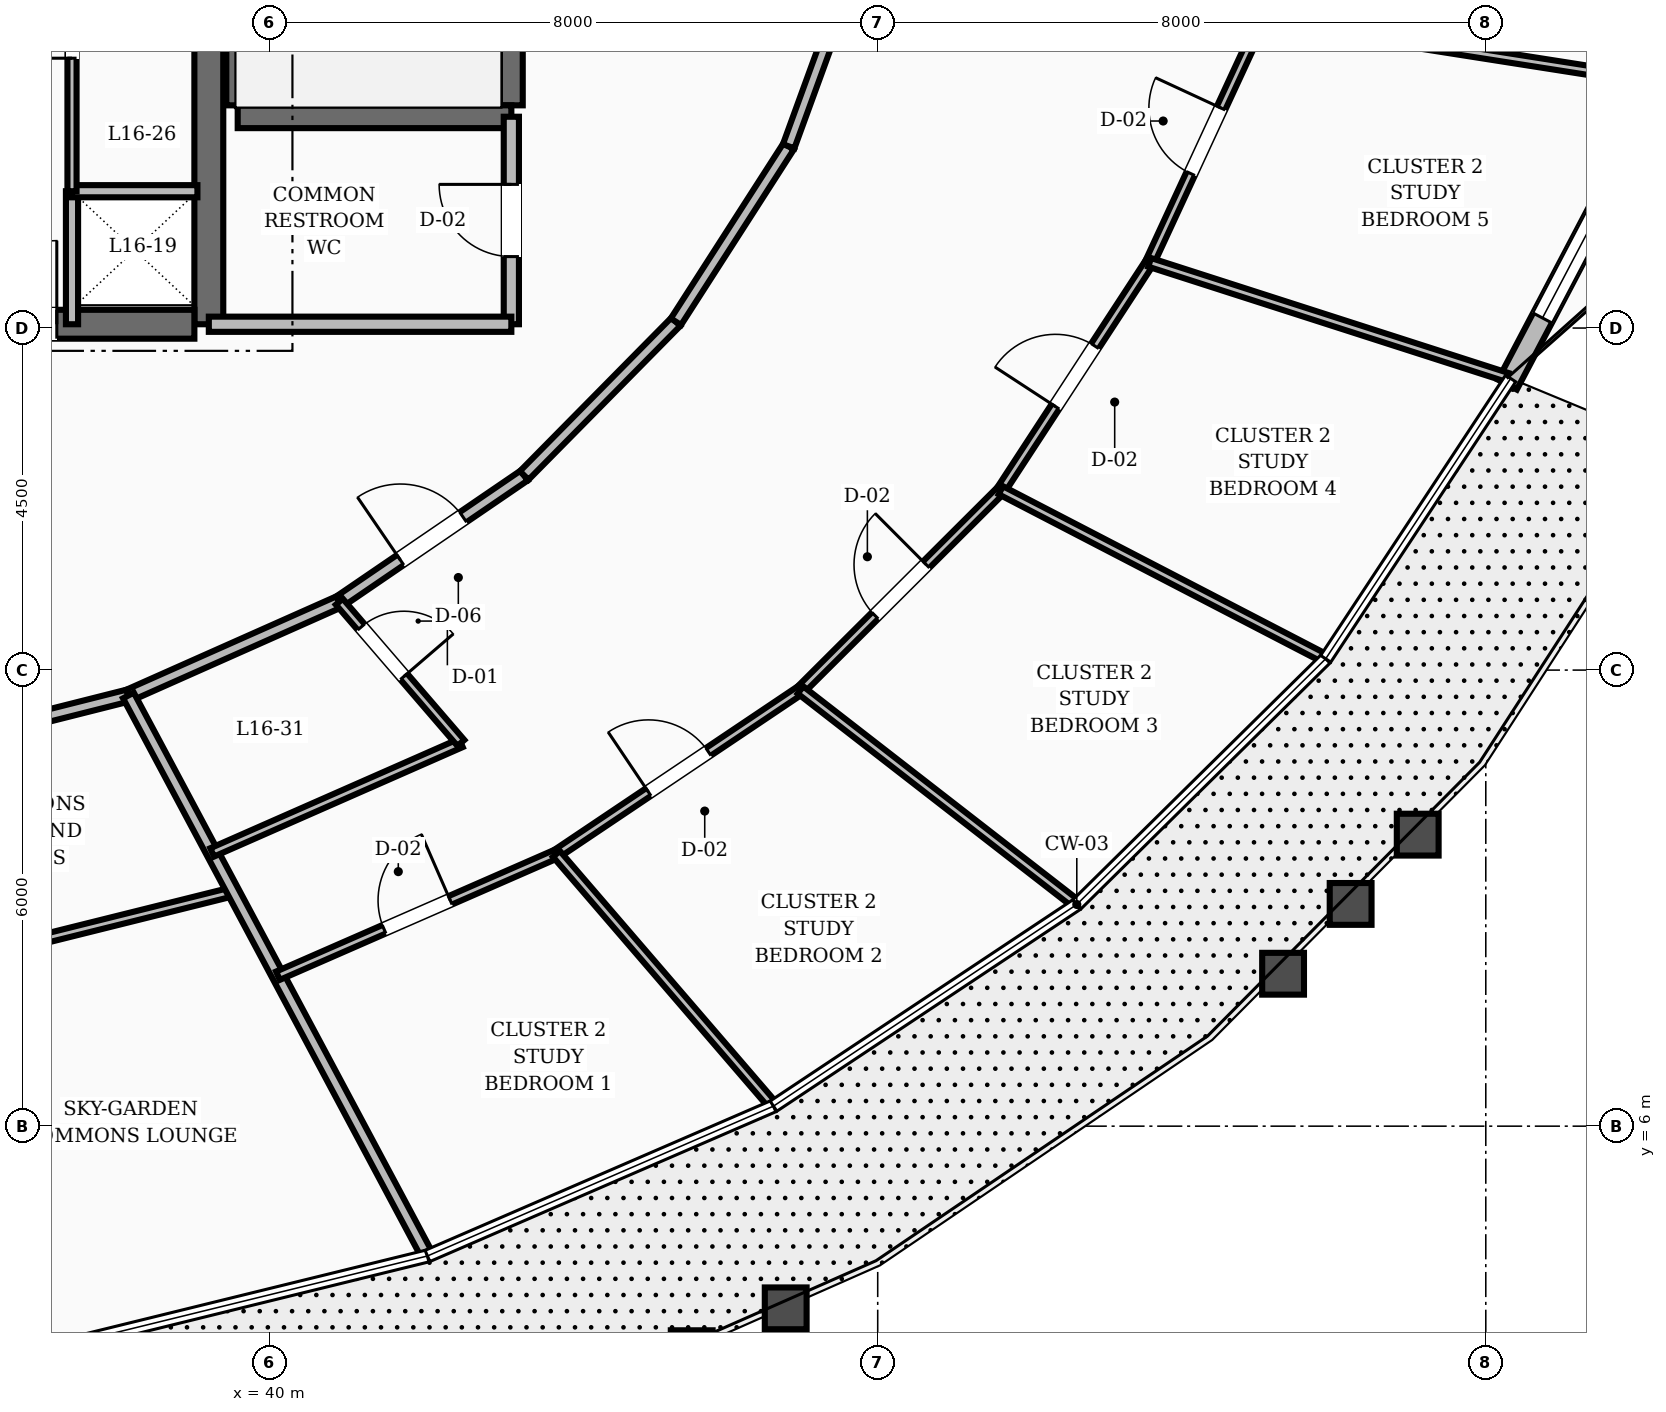
"""IFC4 building model, lengths in metres.
Left out: names, types, materials, properties, quantities, classifications, styles, units other than length and angle.
Written with IfcOpenShell. Run it as: python <this file> out.ifc"""

import sys

from ifc_helpers import new_model, si_unit, direction, frame, frame_2d, origin, place, context, subcontext, project, spatial, rectangle, extrude, element, fill, save


model = new_model("IFC4")
c1 = context("Model", 3, precision=1e-05, world=origin(), true_north=direction((0.0, 1.0)))
c2 = subcontext(c1, "Body", "Model", "MODEL_VIEW")
j1 = project(units=[si_unit("LENGTHUNIT", "METRE"), si_unit("PLANEANGLEUNIT", "RADIAN")], contexts=[c1])
p1 = place(None, origin())
s1 = spatial("IfcSite", under=j1, at=p1, CompositionType="ELEMENT")
p2 = place(p1, origin())
s2 = spatial("IfcBuilding", under=s1, at=p2, CompositionType="ELEMENT")
p3 = place(p2, frame((0.0, 0.0, 66.4)))
s3 = spatial("IfcBuildingStorey", under=s2, at=p3, CompositionType="ELEMENT", Elevation=66.4)
p4 = place(p3, frame((39.2, 16.55, 0.0), z_axis=(0.0, 0.0, 1.0), x_axis=(0.0, 1.0, 0.0)))
e1 = element("IfcWall", 1, at=p4, inside=s3, PredefinedType="SHEAR", context=c2, shape_type="SweptSolid", body=[
    extrude(rectangle(XDim=6.3, YDim=0.38, at=frame_2d((3.15, 0.0))), origin(), (0.0, 0.0, 1.0), 3.6),
])
p5 = place(p3, frame((35.8, 16.55, 0.0), z_axis=(0.0, 0.0, 1.0), x_axis=(1.0, 0.0, 0.0)))
e2 = element("IfcWall", 2, at=p5, inside=s3, PredefinedType="SHEAR", context=c2, shape_type="SweptSolid", body=[
    extrude(rectangle(XDim=3.21, YDim=0.38, at=frame_2d((1.605, 0.0))), origin(), (0.0, 0.0, 1.0), 3.6),
])
p6 = place(p5, frame((0.3, 0.0, 0.0)))
e3 = element("IfcOpeningElement", 3, at=p6, cuts=e2, PredefinedType="OPENING", context=c2, shape_type="SweptSolid", body=[
    extrude(rectangle(XDim=1.1, YDim=2.1, at=frame_2d((0.55, 1.05))), frame((0.0, 0.2, 0.0), z_axis=(0.0, -1.0, 0.0), x_axis=(1.0, 0.0, 0.0)), (0.0, 0.0, 1.0), 0.4),
])
for number, where, z_axis, x_axis in (
    (4, (43.18, 19.43, 0.0), (0.0, 0.0, 1.0), (0.0, 1.0, 0.0)),
    (5, (39.58, 19.43, 0.0), (0.0, 0.0, 1.0), (0.0, 1.0, 0.0)),
):
    element("IfcWall", number, at=place(p3, frame(where, z_axis=z_axis, x_axis=x_axis)), inside=s3, PredefinedType="SHEAR", context=c2, shape_type="SweptSolid", body=[
        extrude(rectangle(XDim=8.74, YDim=0.3, at=frame_2d((4.37, 0.0))), origin(), (0.0, 0.0, 1.0), 3.6),
    ])
p7 = place(p3, frame((39.58, 19.28, 0.0), z_axis=(0.0, 0.0, 1.0), x_axis=(1.0, 0.0, 0.0)))
e6 = element("IfcWall", 6, at=p7, inside=s3, PredefinedType="SHEAR", context=c2, shape_type="SweptSolid", body=[
    extrude(rectangle(XDim=3.6, YDim=0.3, at=frame_2d((1.8, 0.0))), origin(), (0.0, 0.0, 1.0), 3.6),
])
p8 = place(p3, frame((56.284, 15.755, 0.0), z_axis=(0.0, 0.0, 1.0), x_axis=(0.465582838715, 0.88500430524, 0.0)))
e7 = element("IfcWall", 7, at=p8, inside=s3, PredefinedType="STANDARD", context=c2, shape_type="SweptSolid", body=[
    extrude(rectangle(XDim=4.49, YDim=0.28, at=frame_2d((2.245, 0.0))), origin(), (0.0, 0.0, 1.0), 2.71),
])
p9 = place(p8, frame((0.991, 0.0, 0.8)))
e8 = element("IfcOpeningElement", 8, at=p9, cuts=e7, PredefinedType="OPENING", context=c2, shape_type="SweptSolid", body=[
    extrude(rectangle(XDim=2.6, YDim=1.65, at=frame_2d((1.3, 0.825))), frame((0.0, 0.15, 0.0), z_axis=(0.0, -1.0, 0.0), x_axis=(1.0, 0.0, 0.0)), (0.0, 0.0, 1.0), 0.3),
])
p10 = place(p3, frame((43.18, 16.55, 0.0), z_axis=(0.0, 0.0, 1.0), x_axis=(0.0, 1.0, 0.0)))
e9 = element("IfcWall", 9, at=p10, inside=s3, PredefinedType="SOLIDWALL", context=c2, shape_type="SweptSolid", body=[
    extrude(rectangle(XDim=2.73, YDim=0.2, at=frame_2d((1.365, 0.0))), origin(), (0.0, 0.0, 1.0), 2.71),
])
p11 = place(p10, frame((0.89, 0.0, 0.0)))
e10 = element("IfcOpeningElement", 10, at=p11, cuts=e9, PredefinedType="OPENING", context=c2, shape_type="SweptSolid", body=[
    extrude(rectangle(XDim=0.95, YDim=2.1, at=frame_2d((0.475, 1.05))), frame((0.0, 0.11, 0.0), z_axis=(0.0, -1.0, 0.0), x_axis=(1.0, 0.0, 0.0)), (0.0, 0.0, 1.0), 0.22),
])
p12 = place(p3, frame((39.2, 16.55, 0.0), z_axis=(0.0, 0.0, 1.0), x_axis=(1.0, 0.0, 0.0)))
e11 = element("IfcWall", 11, at=p12, inside=s3, PredefinedType="SOLIDWALL", context=c2, shape_type="SweptSolid", body=[
    extrude(rectangle(XDim=3.98, YDim=0.2, at=frame_2d((1.99, 0.0))), origin(), (0.0, 0.0, 1.0), 2.71),
])
p13 = place(p3, frame((37.4, 16.55, 0.0), z_axis=(0.0, 0.0, 1.0), x_axis=(0.0, 1.0, 0.0)))
e12 = element("IfcWall", 12, at=p13, inside=s3, PredefinedType="SOLIDWALL", context=c2, shape_type="SweptSolid", body=[
    extrude(rectangle(XDim=1.75, YDim=0.16, at=frame_2d((0.875, 0.0))), origin(), (0.0, 0.0, 1.0), 2.71),
])
p14 = place(p3, frame((37.4, 18.3, 0.0), z_axis=(0.0, 0.0, 1.0), x_axis=(1.0, 0.0, 0.0)))
e13 = element("IfcWall", 13, at=p14, inside=s3, PredefinedType="SOLIDWALL", context=c2, shape_type="SweptSolid", body=[
    extrude(rectangle(XDim=1.65, YDim=0.16, at=frame_2d((0.825, 0.0))), origin(), (0.0, 0.0, 1.0), 2.71),
])
p15 = place(p3, frame((37.4, 18.3, 0.0), z_axis=(0.0, 0.0, 1.0), x_axis=(0.0, 1.0, 0.0)))
e14 = element("IfcWall", 14, at=p15, inside=s3, PredefinedType="PARTITIONING", context=c2, shape_type="SweptSolid", body=[
    extrude(rectangle(XDim=4.45, YDim=0.12, at=frame_2d((2.225, 0.0))), origin(), (0.0, 0.0, 1.0), 2.71),
])
p16 = place(p15, frame((1.75, 0.0, 0.0)))
e15 = element("IfcOpeningElement", 15, at=p16, cuts=e14, PredefinedType="OPENING", context=c2, shape_type="SweptSolid", body=[
    extrude(rectangle(XDim=0.95, YDim=2.1, at=frame_2d((0.475, 1.05))), frame((0.0, 0.07, 0.0), z_axis=(0.0, -1.0, 0.0), x_axis=(1.0, 0.0, 0.0)), (0.0, 0.0, 1.0), 0.14),
])
p17 = place(p3, frame((35.131, 10.906, 0.0), z_axis=(0.0, 0.0, 1.0), x_axis=(0.969608333194, 0.244662380029, 0.0)))
e16 = element("IfcWall", 16, at=p17, inside=s3, PredefinedType="SOLIDWALL", context=c2, shape_type="SweptSolid", body=[
    extrude(rectangle(XDim=3.105, YDim=0.16, at=frame_2d((1.553, 0.0))), origin(), (0.0, 0.0, 1.0), 2.71),
])
p18 = place(p3, frame((38.142, 11.666, 0.0), z_axis=(0.0, 0.0, 1.0), x_axis=(0.913768445178, 0.406235434936, 0.0)))
e17 = element("IfcWall", 17, at=p18, inside=s3, PredefinedType="SOLIDWALL", context=c2, shape_type="SweptSolid", body=[
    extrude(rectangle(XDim=3.037, YDim=0.16, at=frame_2d((1.519, 0.0))), origin(), (0.0, 0.0, 1.0), 2.71),
])
p19 = place(p3, frame((40.917, 12.9, 0.0), z_axis=(0.0, 0.0, 1.0), x_axis=(0.825929039072, 0.563774088104, 0.0)))
e18 = element("IfcWall", 18, at=p19, inside=s3, PredefinedType="SOLIDWALL", context=c2, shape_type="SweptSolid", body=[
    extrude(rectangle(XDim=2.945, YDim=0.16, at=frame_2d((1.472, 0.0))), origin(), (0.0, 0.0, 1.0), 2.71),
])
p20 = place(p19, frame((0.972, 0.0, 0.0)))
e19 = element("IfcOpeningElement", 19, at=p20, cuts=e18, PredefinedType="OPENING", context=c2, shape_type="SweptSolid", body=[
    extrude(rectangle(XDim=1.0, YDim=2.1, at=frame_2d((0.5, 1.05))), frame((0.0, 0.09, 0.0), z_axis=(0.0, -1.0, 0.0), x_axis=(1.0, 0.0, 0.0)), (0.0, 0.0, 1.0), 0.18),
])
p21 = place(p3, frame((43.349, 14.56, 0.0), z_axis=(0.0, 0.0, 1.0), x_axis=(0.702366174226, 0.711815816981, 0.0)))
e20 = element("IfcWall", 20, at=p21, inside=s3, PredefinedType="SOLIDWALL", context=c2, shape_type="SweptSolid", body=[
    extrude(rectangle(XDim=2.842, YDim=0.16, at=frame_2d((1.421, 0.0))), origin(), (0.0, 0.0, 1.0), 2.71),
])
p22 = place(p3, frame((45.345, 16.583, 0.0), z_axis=(0.0, 0.0, 1.0), x_axis=(0.540595670038, 0.841282545603, 0.0)))
e21 = element("IfcWall", 21, at=p22, inside=s3, PredefinedType="SOLIDWALL", context=c2, shape_type="SweptSolid", body=[
    extrude(rectangle(XDim=2.744, YDim=0.16, at=frame_2d((1.372, 0.0))), origin(), (0.0, 0.0, 1.0), 2.71),
])
p23 = place(p3, frame((46.828, 18.891, 0.0), z_axis=(0.0, 0.0, 1.0), x_axis=(0.342617982381, 0.939474809747, 0.0)))
e22 = element("IfcWall", 22, at=p23, inside=s3, PredefinedType="SOLIDWALL", context=c2, shape_type="SweptSolid", body=[
    extrude(rectangle(XDim=2.666, YDim=0.16, at=frame_2d((1.333, 0.0))), origin(), (0.0, 0.0, 1.0), 2.71),
])
p24 = place(p3, frame((35.833, 8.167, 0.0), z_axis=(0.0, 0.0, 1.0), x_axis=(0.970331231557, 0.241779447153, 0.0)))
e23 = element("IfcWall", 23, at=p24, inside=s3, PredefinedType="PARTITIONING", context=c2, shape_type="SweptSolid", body=[
    extrude(rectangle(XDim=3.799, YDim=0.12, at=frame_2d((1.899, 0.0))), origin(), (0.0, 0.0, 1.0), 2.71),
])
p25 = place(p3, frame((38.142, 11.666, 0.0), z_axis=(0.0, 0.0, 1.0), x_axis=(0.470742278438, -0.88227076756, 0.0)))
e24 = element("IfcWall", 24, at=p25, inside=s3, PredefinedType="SOLIDWALL", context=c2, shape_type="SweptSolid", body=[
    extrude(rectangle(XDim=8.308, YDim=0.16, at=frame_2d((4.154, 0.0))), origin(), (0.0, 0.0, 1.0), 2.71),
])
p26 = place(p3, frame((39.244, 9.602, 0.0), z_axis=(0.0, 0.0, 1.0), x_axis=(0.915283816573, 0.402809551922, 0.0)))
e25 = element("IfcWall", 25, at=p26, inside=s3, PredefinedType="PARTITIONING", context=c2, shape_type="SweptSolid", body=[
    extrude(rectangle(XDim=3.575, YDim=0.12, at=frame_2d((1.788, 0.0))), origin(), (0.0, 0.0, 1.0), 2.71),
])
p27 = place(p3, frame((40.917, 12.9, 0.0), z_axis=(0.0, 0.0, 1.0), x_axis=(0.652356342029, -0.757912397982, 0.0)))
e26 = element("IfcWall", 26, at=p27, inside=s3, PredefinedType="PARTITIONING", context=c2, shape_type="SweptSolid", body=[
    extrude(rectangle(XDim=2.452, YDim=0.12, at=frame_2d((1.226, 0.0))), origin(), (0.0, 0.0, 1.0), 2.71),
])
p28 = place(p27, frame((0.44, 0.0, 0.0)))
e27 = element("IfcOpeningElement", 27, at=p28, cuts=e26, PredefinedType="OPENING", context=c2, shape_type="SweptSolid", body=[
    extrude(rectangle(XDim=0.86, YDim=2.1, at=frame_2d((0.43, 1.05))), frame((0.0, 0.07, 0.0), z_axis=(0.0, -1.0, 0.0), x_axis=(1.0, 0.0, 0.0)), (0.0, 0.0, 1.0), 0.14),
])
p29 = place(p3, frame((40.109, 7.979, 0.0), z_axis=(0.0, 0.0, 1.0), x_axis=(0.916182555568, 0.400761181844, 0.0)))
e28 = element("IfcWall", 28, at=p29, inside=s3, PredefinedType="PARTITIONING", context=c2, shape_type="SweptSolid", body=[
    extrude(rectangle(XDim=3.999, YDim=0.12, at=frame_2d((2.0, 0.0))), origin(), (0.0, 0.0, 1.0), 2.71),
])
p30 = place(p29, frame((1.524, 0.0, 0.0)))
e29 = element("IfcOpeningElement", 29, at=p30, cuts=e28, PredefinedType="OPENING", context=c2, shape_type="SweptSolid", body=[
    extrude(rectangle(XDim=0.95, YDim=2.1, at=frame_2d((0.475, 1.05))), frame((0.0, 0.07, 0.0), z_axis=(0.0, -1.0, 0.0), x_axis=(1.0, 0.0, 0.0)), (0.0, 0.0, 1.0), 0.14),
])
p31 = place(p3, frame((43.773, 9.582, 0.0), z_axis=(0.0, 0.0, 1.0), x_axis=(0.830171470733, 0.557508142704, 0.0)))
e30 = element("IfcWall", 30, at=p31, inside=s3, PredefinedType="PARTITIONING", context=c2, shape_type="SweptSolid", body=[
    extrude(rectangle(XDim=3.868, YDim=0.12, at=frame_2d((1.934, 0.0))), origin(), (0.0, 0.0, 1.0), 2.71),
])
p32 = place(p31, frame((1.459, 0.0, 0.0)))
e31 = element("IfcOpeningElement", 31, at=p32, cuts=e30, PredefinedType="OPENING", context=c2, shape_type="SweptSolid", body=[
    extrude(rectangle(XDim=0.95, YDim=2.1, at=frame_2d((0.475, 1.05))), frame((0.0, 0.07, 0.0), z_axis=(0.0, -1.0, 0.0), x_axis=(1.0, 0.0, 0.0)), (0.0, 0.0, 1.0), 0.14),
])
p33 = place(p3, frame((43.773, 9.582, 0.0), z_axis=(0.0, 0.0, 1.0), x_axis=(0.652364767319, -0.757905146018, 0.0)))
e32 = element("IfcWall", 32, at=p33, inside=s3, PredefinedType="PARTITIONING", context=c2, shape_type="SweptSolid", body=[
    extrude(rectangle(XDim=4.328, YDim=0.12, at=frame_2d((2.164, 0.0))), origin(), (0.0, 0.0, 1.0), 2.71),
])
p34 = place(p3, frame((46.984, 11.738, 0.0), z_axis=(0.0, 0.0, 1.0), x_axis=(0.708122902463, 0.706089197629, 0.0)))
e33 = element("IfcWall", 33, at=p34, inside=s3, PredefinedType="PARTITIONING", context=c2, shape_type="SweptSolid", body=[
    extrude(rectangle(XDim=3.721, YDim=0.12, at=frame_2d((1.861, 0.0))), origin(), (0.0, 0.0, 1.0), 2.71),
])
p35 = place(p34, frame((1.386, 0.0, 0.0)))
e34 = element("IfcOpeningElement", 34, at=p35, cuts=e33, PredefinedType="OPENING", context=c2, shape_type="SweptSolid", body=[
    extrude(rectangle(XDim=0.95, YDim=2.1, at=frame_2d((0.475, 1.05))), frame((0.0, 0.07, 0.0), z_axis=(0.0, -1.0, 0.0), x_axis=(1.0, 0.0, 0.0)), (0.0, 0.0, 1.0), 0.14),
])
p36 = place(p3, frame((46.984, 11.738, 0.0), z_axis=(0.0, 0.0, 1.0), x_axis=(0.789906415473, -0.613227408712, 0.0)))
e35 = element("IfcWall", 35, at=p36, inside=s3, PredefinedType="PARTITIONING", context=c2, shape_type="SweptSolid", body=[
    extrude(rectangle(XDim=4.552, YDim=0.12, at=frame_2d((2.276, 0.0))), origin(), (0.0, 0.0, 1.0), 2.71),
])
p37 = place(p3, frame((49.619, 14.366, 0.0), z_axis=(0.0, 0.0, 1.0), x_axis=(0.546856201366, 0.837226549404, 0.0)))
e36 = element("IfcWall", 36, at=p37, inside=s3, PredefinedType="PARTITIONING", context=c2, shape_type="SweptSolid", body=[
    extrude(rectangle(XDim=3.581, YDim=0.12, at=frame_2d((1.791, 0.0))), origin(), (0.0, 0.0, 1.0), 2.71),
])
p38 = place(p37, frame((1.315, 0.0, 0.0)))
e37 = element("IfcOpeningElement", 37, at=p38, cuts=e36, PredefinedType="OPENING", context=c2, shape_type="SweptSolid", body=[
    extrude(rectangle(XDim=0.95, YDim=2.1, at=frame_2d((0.475, 1.05))), frame((0.0, 0.07, 0.0), z_axis=(0.0, -1.0, 0.0), x_axis=(1.0, 0.0, 0.0)), (0.0, 0.0, 1.0), 0.14),
])
p39 = place(p3, frame((49.619, 14.366, 0.0), z_axis=(0.0, 0.0, 1.0), x_axis=(0.887688609881, -0.460444276636, 0.0)))
e38 = element("IfcWall", 38, at=p39, inside=s3, PredefinedType="PARTITIONING", context=c2, shape_type="SweptSolid", body=[
    extrude(rectangle(XDim=4.765, YDim=0.12, at=frame_2d((2.383, 0.0))), origin(), (0.0, 0.0, 1.0), 2.71),
])
p40 = place(p3, frame((51.578, 17.364, 0.0), z_axis=(0.0, 0.0, 1.0), x_axis=(0.420077084971, 0.907488425646, 0.0)))
e39 = element("IfcWall", 39, at=p40, inside=s3, PredefinedType="PARTITIONING", context=c2, shape_type="SweptSolid", body=[
    extrude(rectangle(XDim=3.524, YDim=0.12, at=frame_2d((1.762, 0.0))), origin(), (0.0, 0.0, 1.0), 2.71),
])
p41 = place(p40, frame((1.287, 0.0, 0.0)))
e40 = element("IfcOpeningElement", 40, at=p41, cuts=e39, PredefinedType="OPENING", context=c2, shape_type="SweptSolid", body=[
    extrude(rectangle(XDim=0.95, YDim=2.1, at=frame_2d((0.475, 1.05))), frame((0.0, 0.07, 0.0), z_axis=(0.0, -1.0, 0.0), x_axis=(1.0, 0.0, 0.0)), (0.0, 0.0, 1.0), 0.14),
])
p42 = place(p3, frame((51.578, 17.364, 0.0), z_axis=(0.0, 0.0, 1.0), x_axis=(0.951991009442, -0.306125983773, 0.0)))
e41 = element("IfcWall", 41, at=p42, inside=s3, PredefinedType="PARTITIONING", context=c2, shape_type="SweptSolid", body=[
    extrude(rectangle(XDim=4.939, YDim=0.12, at=frame_2d((2.469, 0.0))), origin(), (0.0, 0.0, 1.0), 2.71),
])
p43 = place(p3, frame((53.058, 20.562, 0.0), z_axis=(0.0, 0.0, 1.0), x_axis=(0.987942745889, -0.154819672021, 0.0)))
e42 = element("IfcWall", 42, at=p43, inside=s3, PredefinedType="PARTITIONING", context=c2, shape_type="SweptSolid", body=[
    extrude(rectangle(XDim=5.332, YDim=0.12, at=frame_2d((2.666, 0.0))), origin(), (0.0, 0.0, 1.0), 2.71),
])
p44 = place(p9, origin())
e43 = element("IfcWindow", 43, at=p44, inside=s3, PartitioningType="SINGLE_PANEL", PredefinedType="WINDOW", context=c2, shape_type="SweptSolid", body=[
    extrude(rectangle(XDim=2.6, YDim=1.65, at=frame_2d((1.3, 0.825))), frame((0.0, 0.03, 0.0), z_axis=(0.0, -1.0, 0.0), x_axis=(1.0, 0.0, 0.0)), (0.0, 0.0, 1.0), 0.06),
])
fill(e8, e43)
p45 = place(p11, origin())
e44 = element("IfcDoor", 44, at=p45, inside=s3, OperationType="SINGLE_SWING_RIGHT", PredefinedType="DOOR", context=c2, shape_type="SweptSolid", body=[
    extrude(rectangle(XDim=0.95, YDim=2.1, at=frame_2d((0.475, 1.05))), frame((0.0, 0.025, 0.0), z_axis=(0.0, -1.0, 0.0), x_axis=(1.0, 0.0, 0.0)), (0.0, 0.0, 1.0), 0.05),
])
fill(e10, e44)
p46 = place(p6, origin())
e45 = element("IfcDoor", 45, at=p46, inside=s3, OperationType="SINGLE_SWING_RIGHT", PredefinedType="DOOR", context=c2, shape_type="SweptSolid", body=[
    extrude(rectangle(XDim=1.1, YDim=2.1, at=frame_2d((0.55, 1.05))), frame((0.0, 0.025, 0.0), z_axis=(0.0, -1.0, 0.0), x_axis=(1.0, 0.0, 0.0)), (0.0, 0.0, 1.0), 0.05),
])
fill(e3, e45)
p47 = place(p16, origin())
e46 = element("IfcDoor", 46, at=p47, inside=s3, OperationType="SINGLE_SWING_LEFT", PredefinedType="DOOR", context=c2, shape_type="SweptSolid", body=[
    extrude(rectangle(XDim=0.95, YDim=2.1, at=frame_2d((0.475, 1.05))), frame((0.0, 0.025, 0.0), z_axis=(0.0, -1.0, 0.0), x_axis=(1.0, 0.0, 0.0)), (0.0, 0.0, 1.0), 0.05),
])
fill(e15, e46)
p48 = place(p28, origin())
e47 = element("IfcDoor", 47, at=p48, inside=s3, OperationType="SINGLE_SWING_RIGHT", PredefinedType="DOOR", context=c2, shape_type="SweptSolid", body=[
    extrude(rectangle(XDim=0.86, YDim=2.1, at=frame_2d((0.43, 1.05))), frame((0.0, 0.025, 0.0), z_axis=(0.0, -1.0, 0.0), x_axis=(1.0, 0.0, 0.0)), (0.0, 0.0, 1.0), 0.05),
])
fill(e27, e47)
p49 = place(p20, origin())
e48 = element("IfcDoor", 48, at=p49, inside=s3, OperationType="SINGLE_SWING_LEFT", PredefinedType="DOOR", context=c2, shape_type="SweptSolid", body=[
    extrude(rectangle(XDim=1.0, YDim=2.1, at=frame_2d((0.5, 1.05))), frame((0.0, 0.025, 0.0), z_axis=(0.0, -1.0, 0.0), x_axis=(1.0, 0.0, 0.0)), (0.0, 0.0, 1.0), 0.05),
])
fill(e19, e48)
p50 = place(p30, origin())
e49 = element("IfcDoor", 49, at=p50, inside=s3, OperationType="SINGLE_SWING_RIGHT", PredefinedType="DOOR", context=c2, shape_type="SweptSolid", body=[
    extrude(rectangle(XDim=0.95, YDim=2.1, at=frame_2d((0.475, 1.05))), frame((0.0, 0.025, 0.0), z_axis=(0.0, -1.0, 0.0), x_axis=(1.0, 0.0, 0.0)), (0.0, 0.0, 1.0), 0.05),
])
fill(e29, e49)
p51 = place(p32, origin())
e50 = element("IfcDoor", 50, at=p51, inside=s3, OperationType="SINGLE_SWING_LEFT", PredefinedType="DOOR", context=c2, shape_type="SweptSolid", body=[
    extrude(rectangle(XDim=0.95, YDim=2.1, at=frame_2d((0.475, 1.05))), frame((0.0, 0.025, 0.0), z_axis=(0.0, -1.0, 0.0), x_axis=(1.0, 0.0, 0.0)), (0.0, 0.0, 1.0), 0.05),
])
fill(e31, e50)
p52 = place(p35, origin())
e51 = element("IfcDoor", 51, at=p52, inside=s3, OperationType="SINGLE_SWING_RIGHT", PredefinedType="DOOR", context=c2, shape_type="SweptSolid", body=[
    extrude(rectangle(XDim=0.95, YDim=2.1, at=frame_2d((0.475, 1.05))), frame((0.0, 0.025, 0.0), z_axis=(0.0, -1.0, 0.0), x_axis=(1.0, 0.0, 0.0)), (0.0, 0.0, 1.0), 0.05),
])
fill(e34, e51)
p53 = place(p38, origin())
e52 = element("IfcDoor", 52, at=p53, inside=s3, OperationType="SINGLE_SWING_LEFT", PredefinedType="DOOR", context=c2, shape_type="SweptSolid", body=[
    extrude(rectangle(XDim=0.95, YDim=2.1, at=frame_2d((0.475, 1.05))), frame((0.0, 0.025, 0.0), z_axis=(0.0, -1.0, 0.0), x_axis=(1.0, 0.0, 0.0)), (0.0, 0.0, 1.0), 0.05),
])
fill(e37, e52)
p54 = place(p41, origin())
e53 = element("IfcDoor", 53, at=p54, inside=s3, OperationType="SINGLE_SWING_RIGHT", PredefinedType="DOOR", context=c2, shape_type="SweptSolid", body=[
    extrude(rectangle(XDim=0.95, YDim=2.1, at=frame_2d((0.475, 1.05))), frame((0.0, 0.025, 0.0), z_axis=(0.0, -1.0, 0.0), x_axis=(1.0, 0.0, 0.0)), (0.0, 0.0, 1.0), 0.05),
])
fill(e40, e53)
save(model, sys.argv[1])
